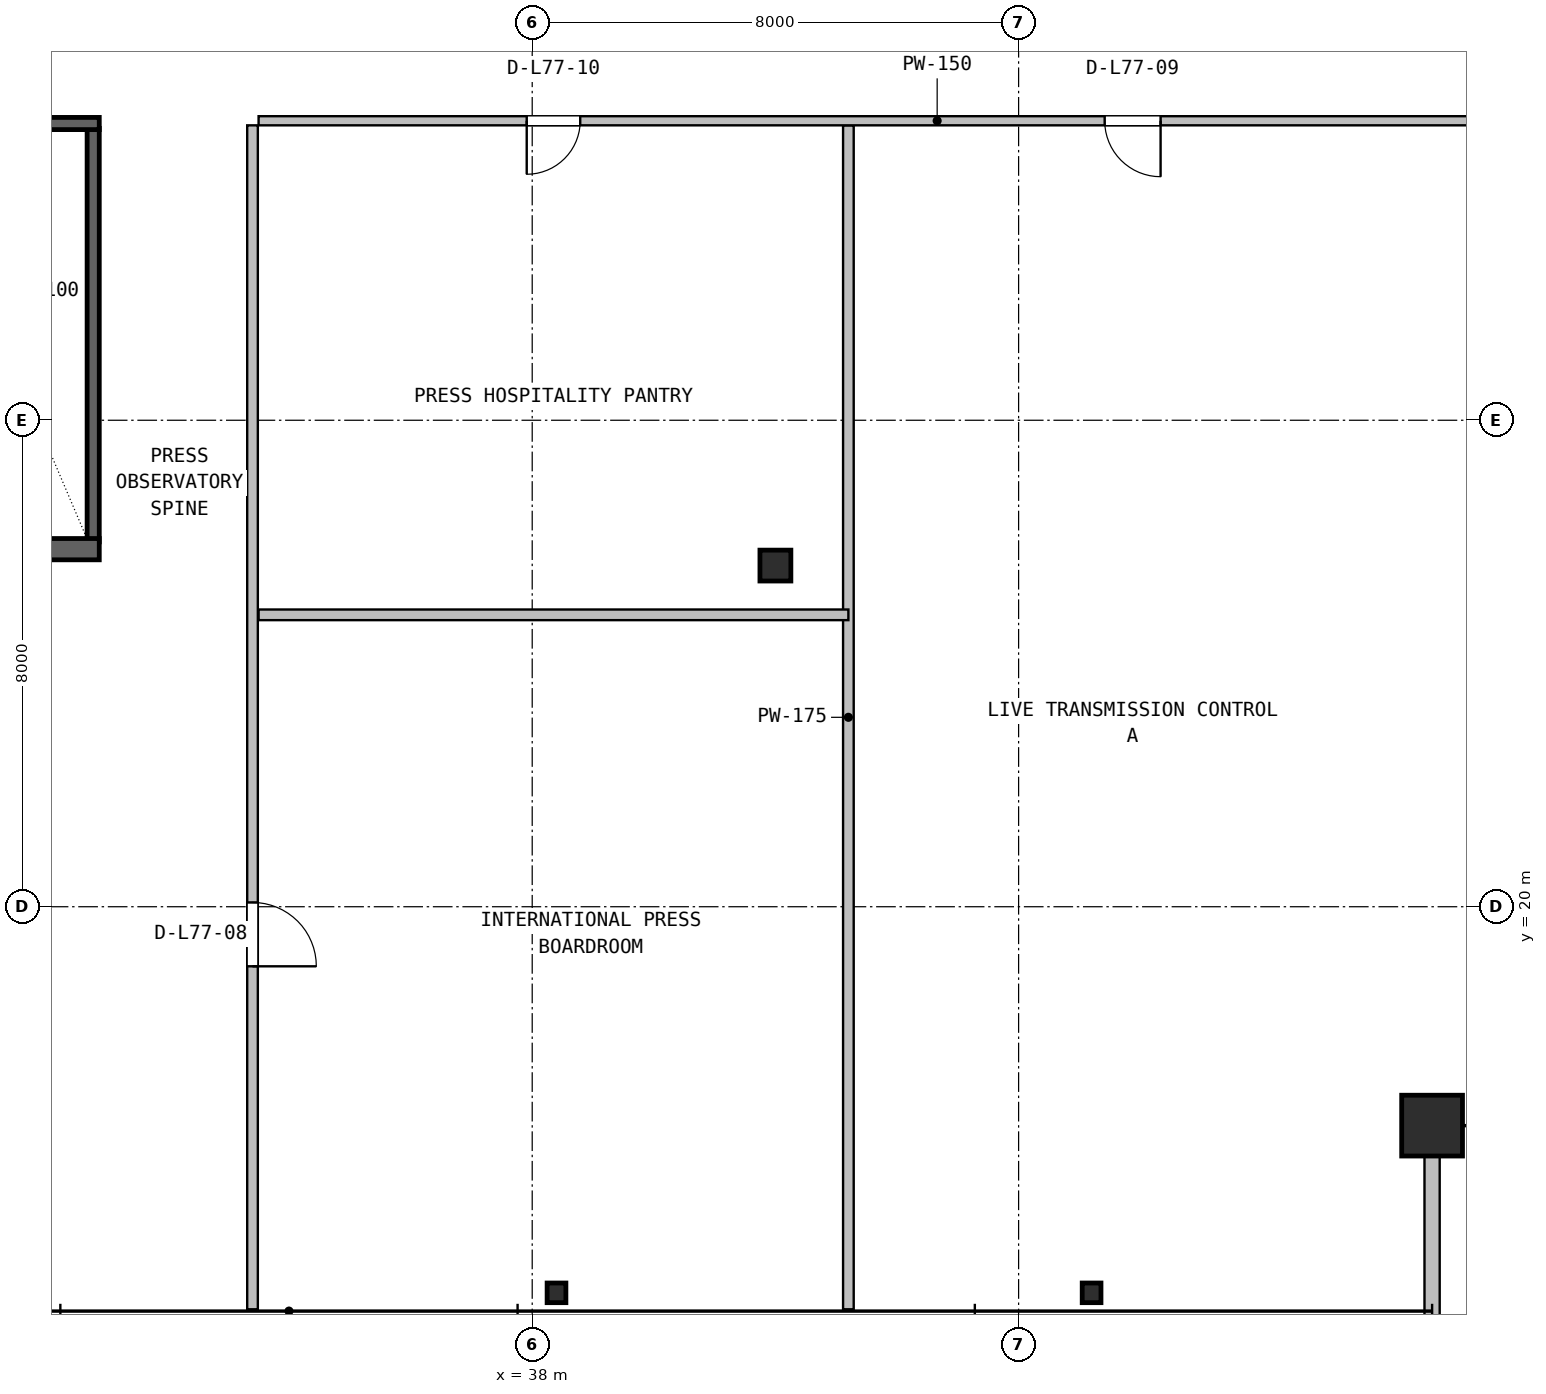
"""IFC4 building model, lengths in metres.
Left out: names, types, materials, properties, quantities, classifications, styles, units other than length and angle.
Written with IfcOpenShell. Run it as: python <this file> out.ifc"""

import sys

from ifc_helpers import new_model, si_unit, direction, frame, frame_2d, origin, origin_2d, place, context, subcontext, project, spatial, rectangle, hollow_rectangle, hollow_circle, i_section, extrude, source, transform, mapped, element, fill, save


model = new_model("IFC4")
c1 = context("Model", 3, precision=1e-05, world=origin(), true_north=direction((0.0, 1.0)))
c2 = subcontext(c1, "Body", "Model", "MODEL_VIEW")
j1 = project(units=[si_unit("LENGTHUNIT", "METRE"), si_unit("PLANEANGLEUNIT", "RADIAN")], contexts=[c1])
p1 = place(None, origin())
s1 = spatial("IfcSite", under=j1, at=p1, CompositionType="ELEMENT")
p2 = place(p1, origin())
s2 = spatial("IfcBuilding", under=s1, at=p2, CompositionType="ELEMENT")
p3 = place(p2, frame((0.0, 0.0, 309.8)))
s3 = spatial("IfcBuildingStorey", under=s2, at=p3, CompositionType="ELEMENT", Elevation=309.8)
m1 = source(origin(), c2, "Body", "SweptSolid", [
    extrude(hollow_rectangle(XDim=1.0, YDim=1.0, WallThickness=0.04, at=origin_2d()), origin(), (0.0, 0.0, 1.0), 4.8),
])
p4 = place(p3, frame((52.8, 16.4, 0.0), z_axis=(0.0, 0.0, 1.0), x_axis=(1.0, 0.0, 0.0)))
e1 = element("IfcColumn", 1, at=p4, inside=s3, PredefinedType="COLUMN", context=c2, shape_type="MappedRepresentation", body=[
    mapped(m1, transform((0.0, 0.0, 0.0), x_axis=(1.0, 0.0, 0.0), y_axis=(0.0, 1.0, 0.0), z_axis=(0.0, 0.0, 1.0), scale=1.0)),
])
m2 = source(origin(), c2, "Body", "SweptSolid", [
    extrude(i_section(OverallWidth=0.309, OverallDepth=0.323, WebThickness=0.014, FlangeThickness=0.023, FilletRadius=0.015, at=origin_2d()), origin(), (0.0, 0.0, 1.0), 4.8),
])
for number, where, z_axis, x_axis in (
    (2, (38.4, 13.65, 0.0), (0.0, 0.0, 1.0), (1.0, 0.0, 0.0)),
    (3, (47.2, 13.65, 0.0), (0.0, 0.0, 1.0), (1.0, 0.0, 0.0)),
):
    element("IfcColumn", number, at=place(p3, frame(where, z_axis=z_axis, x_axis=x_axis)), inside=s3, PredefinedType="COLUMN", context=c2, shape_type="MappedRepresentation", body=[
        mapped(m2, transform((0.0, 0.0, 0.0), x_axis=(1.0, 0.0, 0.0), y_axis=(0.0, 1.0, 0.0), z_axis=(0.0, 0.0, 1.0), scale=1.0)),
    ])
m3 = source(origin(), c2, "Body", "SweptSolid", [
    extrude(hollow_circle(Radius=0.254, WallThickness=0.02, at=origin_2d()), origin(), (0.0, 0.0, 1.0), 4.8),
])
p5 = place(p3, frame((42.0, 25.61, 0.0), z_axis=(0.0, 0.0, 1.0), x_axis=(1.0, 0.0, 0.0)))
e4 = element("IfcColumn", 4, at=p5, inside=s3, PredefinedType="COLUMN", context=c2, shape_type="MappedRepresentation", body=[
    mapped(m3, transform((0.0, 0.0, 0.0), x_axis=(1.0, 0.0, 0.0), y_axis=(0.0, 1.0, 0.0), z_axis=(0.0, 0.0, 1.0), scale=1.0)),
])
p6 = place(p3, frame((52.8, 13.28, 0.0), z_axis=(0.0, 0.0, 1.0), x_axis=(0.0, 1.0, 0.0)))
e5 = element("IfcWall", 5, at=p6, inside=s3, PredefinedType="SOLIDWALL", context=c2, shape_type="SweptSolid", body=[
    extrude(rectangle(XDim=3.2, YDim=0.25, at=frame_2d((1.6, 0.0))), origin(), (0.0, 0.0, 1.0), 4.101),
])
p7 = place(p3, frame((30.78, 26.0, 0.0), z_axis=(0.0, 0.0, 1.0), x_axis=(0.0, 1.0, 0.0)))
e6 = element("IfcWall", 6, at=p7, inside=s3, PredefinedType="SHEAR", context=c2, shape_type="SweptSolid", body=[
    extrude(rectangle(XDim=6.8, YDim=0.2, at=frame_2d((3.4, 0.0))), origin(), (0.0, 0.0, 1.0), 4.48),
])
p8 = place(p3, frame((27.62, 25.88, 0.0), z_axis=(0.0, 0.0, 1.0), x_axis=(1.0, 0.0, 0.0)))
e7 = element("IfcWall", 7, at=p8, inside=s3, PredefinedType="SHEAR", context=c2, shape_type="SweptSolid", body=[
    extrude(rectangle(XDim=3.26, YDim=0.35, at=frame_2d((1.63, 0.0))), origin(), (0.0, 0.0, 1.0), 4.48),
])
p9 = place(p3, frame((27.62, 32.88, 0.0), z_axis=(0.0, 0.0, 1.0), x_axis=(1.0, 0.0, 0.0)))
e8 = element("IfcWall", 8, at=p9, inside=s3, PredefinedType="SHEAR", context=c2, shape_type="SweptSolid", body=[
    extrude(rectangle(XDim=3.26, YDim=0.2, at=frame_2d((1.63, 0.0))), origin(), (0.0, 0.0, 1.0), 4.48),
])
p10 = place(p9, frame((1.15, 0.0, 0.0)))
e9 = element("IfcOpeningElement", 9, at=p10, cuts=e8, PredefinedType="OPENING", context=c2, shape_type="SweptSolid", body=[
    extrude(rectangle(XDim=0.95, YDim=2.1, at=frame_2d((0.475, 1.05))), frame((0.0, 0.11, 0.0), z_axis=(0.0, -1.0, 0.0), x_axis=(1.0, 0.0, 0.0)), (0.0, 0.0, 1.0), 0.22),
])
p11 = place(p3, frame((43.2, 13.38, 0.0), z_axis=(0.0, 0.0, 1.0), x_axis=(0.0, 1.0, 0.0)))
e10 = element("IfcWall", 10, at=p11, inside=s3, PredefinedType="PARTITIONING", context=c2, shape_type="SweptSolid", body=[
    extrude(rectangle(XDim=19.47, YDim=0.175, at=frame_2d((9.735, 0.0))), origin(), (0.0, 0.0, 1.0), 4.101),
])
p12 = place(p3, frame((33.5, 24.8, 0.0), z_axis=(0.0, 0.0, 1.0), x_axis=(1.0, 0.0, 0.0)))
e11 = element("IfcWall", 11, at=p12, inside=s3, PredefinedType="PARTITIONING", context=c2, shape_type="SweptSolid", body=[
    extrude(rectangle(XDim=9.7, YDim=0.175, at=frame_2d((4.85, 0.0))), origin(), (0.0, 0.0, 1.0), 3.911),
])
p13 = place(p3, frame((33.4, 13.38, 0.0), z_axis=(0.0, 0.0, 1.0), x_axis=(0.0, 1.0, 0.0)))
e12 = element("IfcWall", 12, at=p13, inside=s3, PredefinedType="PARTITIONING", context=c2, shape_type="SweptSolid", body=[
    extrude(rectangle(XDim=19.47, YDim=0.175, at=frame_2d((9.735, 0.0))), origin(), (0.0, 0.0, 1.0), 3.911),
])
p14 = place(p13, frame((5.64, 0.0, 0.0)))
e13 = element("IfcOpeningElement", 13, at=p14, cuts=e12, PredefinedType="OPENING", context=c2, shape_type="SweptSolid", body=[
    extrude(rectangle(XDim=1.05, YDim=2.1, at=frame_2d((0.525, 1.05))), frame((0.0, 0.098, 0.0), z_axis=(0.0, -1.0, 0.0), x_axis=(1.0, 0.0, 0.0)), (0.0, 0.0, 1.0), 0.195),
])
p15 = place(p3, frame((33.5, 32.925, 0.0), z_axis=(0.0, 0.0, 1.0), x_axis=(1.0, 0.0, 0.0)))
e14 = element("IfcWall", 14, at=p15, inside=s3, PredefinedType="PARTITIONING", context=c2, shape_type="SweptSolid", body=[
    extrude(rectangle(XDim=22.32, YDim=0.15, at=frame_2d((11.16, 0.0))), origin(), (0.0, 0.0, 1.0), 3.911),
])
p16 = place(p15, frame((13.915, 0.0, 0.0)))
e15 = element("IfcOpeningElement", 15, at=p16, cuts=e14, PredefinedType="OPENING", context=c2, shape_type="SweptSolid", body=[
    extrude(rectangle(XDim=0.92, YDim=2.08, at=frame_2d((0.46, 1.04))), frame((0.0, 0.085, 0.0), z_axis=(0.0, -1.0, 0.0), x_axis=(1.0, 0.0, 0.0)), (0.0, 0.0, 1.0), 0.17),
])
p17 = place(p15, frame((4.41, 0.0, 0.0)))
e16 = element("IfcOpeningElement", 16, at=p17, cuts=e14, PredefinedType="OPENING", context=c2, shape_type="SweptSolid", body=[
    extrude(rectangle(XDim=0.88, YDim=2.06, at=frame_2d((0.44, 1.03))), frame((0.0, 0.085, 0.0), z_axis=(0.0, -1.0, 0.0), x_axis=(1.0, 0.0, 0.0)), (0.0, 0.0, 1.0), 0.17),
])
m4 = source(origin(), c2, "Body", "SweptSolid", [
    extrude(rectangle(XDim=1.05, YDim=2.1, at=frame_2d((0.525, 1.05))), frame((0.0, 0.025, 0.0), z_axis=(0.0, -1.0, 0.0), x_axis=(1.0, 0.0, 0.0)), (0.0, 0.0, 1.0), 0.05),
])
p18 = place(p14, frame((1.05, 0.0, 0.0), z_axis=(0.0, 0.0, 1.0), x_axis=(-1.0, 0.0, 0.0)))
e17 = element("IfcDoor", 17, at=p18, inside=s3, OperationType="SINGLE_SWING_LEFT", PredefinedType="DOOR", context=c2, shape_type="MappedRepresentation", body=[
    mapped(m4, transform((0.0, 0.0, 0.0), x_axis=(1.0, 0.0, 0.0), y_axis=(0.0, 1.0, 0.0), z_axis=(0.0, 0.0, 1.0), scale=1.0)),
])
fill(e13, e17)
m5 = source(origin(), c2, "Body", "SweptSolid", [
    extrude(rectangle(XDim=0.92, YDim=2.08, at=frame_2d((0.46, 1.04))), frame((0.0, 0.025, 0.0), z_axis=(0.0, -1.0, 0.0), x_axis=(1.0, 0.0, 0.0)), (0.0, 0.0, 1.0), 0.05),
])
p19 = place(p16, frame((0.92, 0.0, 0.0), z_axis=(0.0, 0.0, 1.0), x_axis=(-1.0, 0.0, 0.0)))
e18 = element("IfcDoor", 18, at=p19, inside=s3, OperationType="SINGLE_SWING_RIGHT", PredefinedType="DOOR", context=c2, shape_type="MappedRepresentation", body=[
    mapped(m5, transform((0.0, 0.0, 0.0), x_axis=(1.0, 0.0, 0.0), y_axis=(0.0, 1.0, 0.0), z_axis=(0.0, 0.0, 1.0), scale=1.0)),
])
fill(e15, e18)
m6 = source(origin(), c2, "Body", "SweptSolid", [
    extrude(rectangle(XDim=0.88, YDim=2.06, at=frame_2d((0.44, 1.03))), frame((0.0, 0.025, 0.0), z_axis=(0.0, -1.0, 0.0), x_axis=(1.0, 0.0, 0.0)), (0.0, 0.0, 1.0), 0.05),
])
p20 = place(p17, frame((0.88, 0.0, 0.0), z_axis=(0.0, 0.0, 1.0), x_axis=(-1.0, 0.0, 0.0)))
e19 = element("IfcDoor", 19, at=p20, inside=s3, OperationType="SINGLE_SWING_LEFT", PredefinedType="DOOR", context=c2, shape_type="MappedRepresentation", body=[
    mapped(m6, transform((0.0, 0.0, 0.0), x_axis=(1.0, 0.0, 0.0), y_axis=(0.0, 1.0, 0.0), z_axis=(0.0, 0.0, 1.0), scale=1.0)),
])
fill(e16, e19)
save(model, sys.argv[1])
